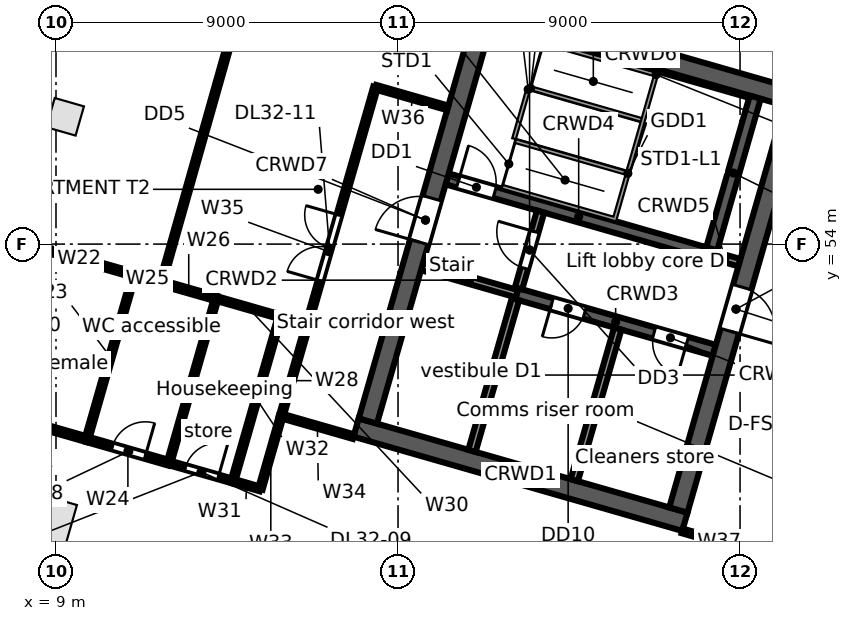
"""IFC4 building model, lengths in metres.
Left out: names, types, materials, properties, quantities, classifications, styles, units other than length and angle.
Written with IfcOpenShell. Run it as: python <this file> out.ifc"""

import sys

from ifc_helpers import new_model, si_unit, direction, frame, frame_2d, origin, origin_2d, place, context, subcontext, project, spatial, rectangle, extrude, element, fill, save


model = new_model("IFC4")
c1 = context("Model", 3, precision=1e-05, world=origin(), true_north=direction((0.0, 1.0)))
c2 = subcontext(c1, "Body", "Model", "MODEL_VIEW")
j1 = project(units=[si_unit("LENGTHUNIT", "METRE"), si_unit("PLANEANGLEUNIT", "RADIAN")], contexts=[c1])
p1 = place(None, origin())
s1 = spatial("IfcSite", under=j1, at=p1, CompositionType="ELEMENT")
p2 = place(p1, origin())
s2 = spatial("IfcBuilding", under=s1, at=p2, CompositionType="ELEMENT")
p3 = place(p2, frame((0.0, 0.0, 154.9)))
s3 = spatial("IfcBuildingStorey", under=s2, at=p3, CompositionType="ELEMENT", Elevation=154.9)
p4 = place(p3, frame((8.81, 46.722, 0.0), z_axis=(0.0, 0.0, 1.0), x_axis=(0.961261695938, -0.275637355817, 0.0)))
e1 = element("IfcColumn", 1, at=p4, inside=s3, PredefinedType="COLUMN", context=c2, shape_type="SweptSolid", body=[
    extrude(rectangle(XDim=1.2, YDim=1.2, at=origin_2d()), origin(), (0.0, 0.0, 1.0), 4.0),
])
p5 = place(p3, frame((9.241, 57.35, 0.0), z_axis=(0.0, 0.0, 1.0), x_axis=(0.961261695938, -0.275637355817, 0.0)))
e2 = element("IfcColumn", 2, at=p5, inside=s3, PredefinedType="COLUMN", context=c2, shape_type="SweptSolid", body=[
    extrude(rectangle(XDim=0.8, YDim=0.8, at=origin_2d()), origin(), (0.0, 0.0, 1.0), 4.0),
])
p6 = place(p3, frame((24.042, 41.106, 0.0), z_axis=(0.0, 0.0, 1.0), x_axis=(-0.961261693976, 0.275637362661, 0.0)))
e3 = element("IfcWall", 3, at=p6, inside=s3, PredefinedType="STANDARD", context=c2, shape_type="SweptSolid", body=[
    extrude(rectangle(XDim=24.948, YDim=0.3, at=frame_2d((12.474, 0.0))), origin(), (0.0, 0.0, 1.0), 3.68),
])
p7 = place(p6, frame((21.441, 0.0, 0.6)))
e4 = element("IfcOpeningElement", 4, at=p7, cuts=e3, PredefinedType="OPENING", context=c2, shape_type="SweptSolid", body=[
    extrude(rectangle(XDim=0.9, YDim=2.4, at=frame_2d((0.45, 1.2))), frame((0.0, 0.16, 0.0), z_axis=(0.0, -1.0, 0.0), x_axis=(1.0, 0.0, 0.0)), (0.0, 0.0, 1.0), 0.32),
])
p8 = place(p6, frame((13.121, 0.0, 0.6)))
e5 = element("IfcOpeningElement", 5, at=p8, cuts=e3, PredefinedType="OPENING", context=c2, shape_type="SweptSolid", body=[
    extrude(rectangle(XDim=0.9, YDim=2.4, at=frame_2d((0.45, 1.2))), frame((0.0, 0.16, 0.0), z_axis=(0.0, -1.0, 0.0), x_axis=(1.0, 0.0, 0.0)), (0.0, 0.0, 1.0), 0.32),
])
p9 = place(p6, frame((10.591, 0.0, 0.0)))
e6 = element("IfcOpeningElement", 6, at=p9, cuts=e3, PredefinedType="OPENING", context=c2, shape_type="SweptSolid", body=[
    extrude(rectangle(XDim=1.8, YDim=2.4, at=frame_2d((0.9, 1.2))), frame((0.0, 0.16, 0.0), z_axis=(0.0, -1.0, 0.0), x_axis=(1.0, 0.0, 0.0)), (0.0, 0.0, 1.0), 0.32),
])
p10 = place(p6, frame((4.8, 0.0, 0.6)))
e7 = element("IfcOpeningElement", 7, at=p10, cuts=e3, PredefinedType="OPENING", context=c2, shape_type="SweptSolid", body=[
    extrude(rectangle(XDim=0.9, YDim=2.4, at=frame_2d((0.45, 1.2))), frame((0.0, 0.16, 0.0), z_axis=(0.0, -1.0, 0.0), x_axis=(1.0, 0.0, 0.0)), (0.0, 0.0, 1.0), 0.32),
])
p11 = place(p6, frame((2.27, 0.0, 0.0)))
e8 = element("IfcOpeningElement", 8, at=p11, cuts=e3, PredefinedType="OPENING", context=c2, shape_type="SweptSolid", body=[
    extrude(rectangle(XDim=1.8, YDim=2.4, at=frame_2d((0.9, 1.2))), frame((0.0, 0.16, 0.0), z_axis=(0.0, -1.0, 0.0), x_axis=(1.0, 0.0, 0.0)), (0.0, 0.0, 1.0), 0.32),
])
p12 = place(p3, frame((37.399, 59.851, 0.0), z_axis=(0.0, 0.0, 1.0), x_axis=(-0.529919986982, -0.848047644532, 0.0)))
e9 = element("IfcWall", 9, at=p12, inside=s3, PredefinedType="STANDARD", context=c2, shape_type="SweptSolid", body=[
    extrude(rectangle(XDim=21.125, YDim=0.3, at=frame_2d((10.562, 0.0))), origin(), (0.0, 0.0, 1.0), 3.68),
])
p13 = place(p12, frame((16.687, 0.0, 0.6)))
e10 = element("IfcOpeningElement", 10, at=p13, cuts=e9, PredefinedType="OPENING", context=c2, shape_type="SweptSolid", body=[
    extrude(rectangle(XDim=0.9, YDim=2.4, at=frame_2d((0.45, 1.2))), frame((0.0, 0.16, 0.0), z_axis=(0.0, -1.0, 0.0), x_axis=(1.0, 0.0, 0.0)), (0.0, 0.0, 1.0), 0.32),
])
p14 = place(p12, frame((13.612, 0.0, 0.0)))
e11 = element("IfcOpeningElement", 11, at=p14, cuts=e9, PredefinedType="OPENING", context=c2, shape_type="SweptSolid", body=[
    extrude(rectangle(XDim=1.8, YDim=2.4, at=frame_2d((0.9, 1.2))), frame((0.0, 0.16, 0.0), z_axis=(0.0, -1.0, 0.0), x_axis=(1.0, 0.0, 0.0)), (0.0, 0.0, 1.0), 0.32),
])
p15 = place(p12, frame((6.187, 0.0, 0.6)))
e12 = element("IfcOpeningElement", 12, at=p15, cuts=e9, PredefinedType="OPENING", context=c2, shape_type="SweptSolid", body=[
    extrude(rectangle(XDim=0.9, YDim=2.4, at=frame_2d((0.45, 1.2))), frame((0.0, 0.16, 0.0), z_axis=(0.0, -1.0, 0.0), x_axis=(1.0, 0.0, 0.0)), (0.0, 0.0, 1.0), 0.32),
])
p16 = place(p12, frame((3.112, 0.0, 0.0)))
e13 = element("IfcOpeningElement", 13, at=p16, cuts=e9, PredefinedType="OPENING", context=c2, shape_type="SweptSolid", body=[
    extrude(rectangle(XDim=1.8, YDim=2.4, at=frame_2d((0.9, 1.2))), frame((0.0, 0.16, 0.0), z_axis=(0.0, -1.0, 0.0), x_axis=(1.0, 0.0, 0.0)), (0.0, 0.0, 1.0), 0.32),
])
p17 = place(p3, frame((16.897, 49.173, 0.0), z_axis=(0.0, 0.0, 1.0), x_axis=(0.96126248289, -0.275634611374, 0.0)))
e14 = element("IfcWall", 14, at=p17, inside=s3, PredefinedType="SOLIDWALL", context=c2, shape_type="SweptSolid", body=[
    extrude(rectangle(XDim=9.0, YDim=0.5, at=frame_2d((4.5, 0.0))), origin(), (0.0, 0.0, 1.0), 3.68),
])
p18 = place(p3, frame((18.632, 53.409, 0.0), z_axis=(0.0, 0.0, 1.0), x_axis=(0.961247078216, -0.275688328772, 0.0)))
e15 = element("IfcWall", 15, at=p18, inside=s3, PredefinedType="SOLIDWALL", context=c2, shape_type="SweptSolid", body=[
    extrude(rectangle(XDim=2.6, YDim=0.2, at=frame_2d((1.3, 0.0))), origin(), (0.0, 0.0, 1.0), 3.68),
])
p19 = place(p3, frame((21.131, 52.692, 0.0), z_axis=(0.0, 0.0, 1.0), x_axis=(0.961271043721, -0.27560475414, 0.0)))
e16 = element("IfcWall", 16, at=p19, inside=s3, PredefinedType="SOLIDWALL", context=c2, shape_type="SweptSolid", body=[
    extrude(rectangle(XDim=5.4, YDim=0.3, at=frame_2d((2.7, 0.0))), origin(), (0.0, 0.0, 1.0), 3.68),
])
p20 = place(p19, frame((0.95, 0.0, 0.0)))
e17 = element("IfcOpeningElement", 17, at=p20, cuts=e16, PredefinedType="OPENING", context=c2, shape_type="SweptSolid", body=[
    extrude(rectangle(XDim=0.9, YDim=2.1, at=frame_2d((0.45, 1.05))), frame((0.0, 0.16, 0.0), z_axis=(0.0, -1.0, 0.0), x_axis=(1.0, 0.0, 0.0)), (0.0, 0.0, 1.0), 0.32),
])
p21 = place(p19, frame((3.75, 0.0, 0.0)))
e18 = element("IfcOpeningElement", 18, at=p21, cuts=e16, PredefinedType="OPENING", context=c2, shape_type="SweptSolid", body=[
    extrude(rectangle(XDim=0.9, YDim=2.1, at=frame_2d((0.45, 1.05))), frame((0.0, 0.16, 0.0), z_axis=(0.0, -1.0, 0.0), x_axis=(1.0, 0.0, 0.0)), (0.0, 0.0, 1.0), 0.32),
])
p22 = place(p3, frame((19.293, 55.716, 0.0), z_axis=(0.0, 0.0, 1.0), x_axis=(0.96125862491, -0.275648065539, 0.0)))
e19 = element("IfcWall", 19, at=p22, inside=s3, PredefinedType="SOLIDWALL", context=c2, shape_type="SweptSolid", body=[
    extrude(rectangle(XDim=7.2, YDim=0.3, at=frame_2d((3.6, 0.0))), origin(), (0.0, 0.0, 1.0), 3.68),
])
p23 = place(p22, frame((0.3, 0.0, 0.0)))
e20 = element("IfcOpeningElement", 20, at=p23, cuts=e19, PredefinedType="OPENING", context=c2, shape_type="SweptSolid", body=[
    extrude(rectangle(XDim=1.0, YDim=2.1, at=frame_2d((0.5, 1.05))), frame((0.0, 0.16, 0.0), z_axis=(0.0, -1.0, 0.0), x_axis=(1.0, 0.0, 0.0)), (0.0, 0.0, 1.0), 0.32),
])
p24 = place(p3, frame((26.214, 53.732, 0.0), z_axis=(0.0, 0.0, 1.0), x_axis=(0.961200870072, -0.275849392554, 0.0)))
e21 = element("IfcWall", 21, at=p24, inside=s3, PredefinedType="SOLIDWALL", context=c2, shape_type="SweptSolid", body=[
    extrude(rectangle(XDim=0.8, YDim=0.2, at=frame_2d((0.4, 0.0))), origin(), (0.0, 0.0, 1.0), 3.68),
])
p25 = place(p3, frame((20.067, 60.228, 0.0), z_axis=(0.0, 0.0, 1.0), x_axis=(0.96126248289, -0.275634611374, 0.0)))
e22 = element("IfcWall", 22, at=p25, inside=s3, PredefinedType="SOLIDWALL", context=c2, shape_type="SweptSolid", body=[
    extrude(rectangle(XDim=9.0, YDim=0.5, at=frame_2d((4.5, 0.0))), origin(), (0.0, 0.0, 1.0), 3.68),
])
p26 = place(p3, frame((17.206, 49.344, 0.0), z_axis=(0.0, 0.0, 1.0), x_axis=(0.275632651182, 0.961263044958, 0.0)))
e23 = element("IfcWall", 23, at=p26, inside=s3, PredefinedType="SOLIDWALL", context=c2, shape_type="SweptSolid", body=[
    extrude(rectangle(XDim=11.0, YDim=0.5, at=frame_2d((5.5, 0.0))), origin(), (0.0, 0.0, 1.0), 3.68),
])
p27 = place(p26, frame((4.9, 0.0, 0.0)))
e24 = element("IfcOpeningElement", 24, at=p27, cuts=e23, PredefinedType="OPENING", context=c2, shape_type="SweptSolid", body=[
    extrude(rectangle(XDim=1.2, YDim=2.1, at=frame_2d((0.6, 1.05))), frame((0.0, 0.26, 0.0), z_axis=(0.0, -1.0, 0.0), x_axis=(1.0, 0.0, 0.0)), (0.0, 0.0, 1.0), 0.52),
])
p28 = place(p3, frame((19.946, 48.559, 0.0), z_axis=(0.0, 0.0, 1.0), x_axis=(0.275668905258, 0.961252648721, 0.0)))
e25 = element("IfcWall", 25, at=p28, inside=s3, PredefinedType="SOLIDWALL", context=c2, shape_type="SweptSolid", body=[
    extrude(rectangle(XDim=4.15, YDim=0.2, at=frame_2d((2.075, 0.0))), origin(), (0.0, 0.0, 1.0), 3.68),
])
p29 = place(p3, frame((21.172, 52.837, 0.0), z_axis=(0.0, 0.0, 1.0), x_axis=(0.275657676022, 0.961255868981, 0.0)))
e26 = element("IfcWall", 26, at=p29, inside=s3, PredefinedType="PARTITIONING", context=c2, shape_type="SweptSolid", body=[
    extrude(rectangle(XDim=2.1, YDim=0.2, at=frame_2d((1.05, 0.0))), origin(), (0.0, 0.0, 1.0), 3.68),
])
p30 = place(p29, frame((0.55, 0.0, 0.0)))
e27 = element("IfcOpeningElement", 27, at=p30, cuts=e26, PredefinedType="OPENING", context=c2, shape_type="SweptSolid", body=[
    extrude(rectangle(XDim=1.0, YDim=2.1, at=frame_2d((0.5, 1.05))), frame((0.0, 0.11, 0.0), z_axis=(0.0, -1.0, 0.0), x_axis=(1.0, 0.0, 0.0)), (0.0, 0.0, 1.0), 0.22),
])
p31 = place(p3, frame((22.637, 47.787, 0.0), z_axis=(0.0, 0.0, 1.0), x_axis=(0.275614546295, 0.961268236171, 0.0)))
e28 = element("IfcWall", 28, at=p31, inside=s3, PredefinedType="PARTITIONING", context=c2, shape_type="SweptSolid", body=[
    extrude(rectangle(XDim=4.15, YDim=0.2, at=frame_2d((2.075, 0.0))), origin(), (0.0, 0.0, 1.0), 3.68),
])
p32 = place(p3, frame((26.256, 53.876, 0.0), z_axis=(0.0, 0.0, 1.0), x_axis=(0.275614546295, 0.961268236171, 0.0)))
e29 = element("IfcWall", 29, at=p32, inside=s3, PredefinedType="SOLIDWALL", context=c2, shape_type="SweptSolid", body=[
    extrude(rectangle(XDim=4.15, YDim=0.3, at=frame_2d((2.075, 0.0))), origin(), (0.0, 0.0, 1.0), 3.68),
])
p33 = place(p3, frame((25.377, 47.002, 0.0), z_axis=(0.0, 0.0, 1.0), x_axis=(0.275632651182, 0.961263044958, 0.0)))
e30 = element("IfcWall", 30, at=p33, inside=s3, PredefinedType="SOLIDWALL", context=c2, shape_type="SweptSolid", body=[
    extrude(rectangle(XDim=11.0, YDim=0.5, at=frame_2d((5.5, 0.0))), origin(), (0.0, 0.0, 1.0), 3.68),
])
p34 = place(p33, frame((4.9, 0.0, 0.0)))
e31 = element("IfcOpeningElement", 31, at=p34, cuts=e30, PredefinedType="OPENING", context=c2, shape_type="SweptSolid", body=[
    extrude(rectangle(XDim=1.2, YDim=2.1, at=frame_2d((0.6, 1.05))), frame((0.0, 0.26, 0.0), z_axis=(0.0, -1.0, 0.0), x_axis=(1.0, 0.0, 0.0)), (0.0, 0.0, 1.0), 0.52),
])
p35 = place(p3, frame((6.927, 49.691, 0.0), z_axis=(0.0, 0.0, 1.0), x_axis=(0.961268664977, -0.27561305073, 0.0)))
e32 = element("IfcWall", 32, at=p35, inside=s3, PredefinedType="PARTITIONING", context=c2, shape_type="SweptSolid", body=[
    extrude(rectangle(XDim=3.0, YDim=0.15, at=frame_2d((1.5, 0.0))), origin(), (0.0, 0.0, 1.0), 2.748),
])
p36 = place(p35, frame((0.95, 0.0, 0.0)))
e33 = element("IfcOpeningElement", 33, at=p36, cuts=e32, PredefinedType="OPENING", context=c2, shape_type="SweptSolid", body=[
    extrude(rectangle(XDim=0.9, YDim=2.1, at=frame_2d((0.45, 1.05))), frame((0.0, 0.085, 0.0), z_axis=(0.0, -1.0, 0.0), x_axis=(1.0, 0.0, 0.0)), (0.0, 0.0, 1.0), 0.17),
])
p37 = place(p3, frame((8.167, 54.017, 0.0), z_axis=(0.0, 0.0, 1.0), x_axis=(0.961247103494, -0.275688240636, 0.0)))
e34 = element("IfcWall", 34, at=p37, inside=s3, PredefinedType="PARTITIONING", context=c2, shape_type="SweptSolid", body=[
    extrude(rectangle(XDim=3.0, YDim=0.15, at=frame_2d((1.5, 0.0))), origin(), (0.0, 0.0, 1.0), 2.748),
])
p38 = place(p3, frame((9.811, 48.864, 0.0), z_axis=(0.0, 0.0, 1.0), x_axis=(0.275545040649, 0.96128816209, 0.0)))
e35 = element("IfcWall", 35, at=p38, inside=s3, PredefinedType="PARTITIONING", context=c2, shape_type="SweptSolid", body=[
    extrude(rectangle(XDim=4.5, YDim=0.125, at=frame_2d((2.25, 0.0))), origin(), (0.0, 0.0, 1.0), 3.68),
])
p39 = place(p3, frame((9.811, 48.864, 0.0), z_axis=(0.0, 0.0, 1.0), x_axis=(0.961236680145, -0.275724581318, 0.0)))
e36 = element("IfcWall", 36, at=p39, inside=s3, PredefinedType="PARTITIONING", context=c2, shape_type="SweptSolid", body=[
    extrude(rectangle(XDim=2.249, YDim=0.15, at=frame_2d((1.125, 0.0))), origin(), (0.0, 0.0, 1.0), 3.68),
])
p40 = place(p39, frame((0.7, 0.0, 0.0)))
e37 = element("IfcOpeningElement", 37, at=p40, cuts=e36, PredefinedType="OPENING", context=c2, shape_type="SweptSolid", body=[
    extrude(rectangle(XDim=0.9, YDim=2.1, at=frame_2d((0.45, 1.05))), frame((0.0, 0.085, 0.0), z_axis=(0.0, -1.0, 0.0), x_axis=(1.0, 0.0, 0.0)), (0.0, 0.0, 1.0), 0.17),
])
p41 = place(p3, frame((11.051, 53.19, 0.0), z_axis=(0.0, 0.0, 1.0), x_axis=(0.961154610169, -0.276010534854, 0.0)))
e38 = element("IfcWall", 38, at=p41, inside=s3, PredefinedType="PARTITIONING", context=c2, shape_type="SweptSolid", body=[
    extrude(rectangle(XDim=0.75, YDim=0.15, at=frame_2d((0.375, 0.0))), origin(), (0.0, 0.0, 1.0), 3.68),
])
p42 = place(p3, frame((11.772, 52.983, 0.0), z_axis=(0.0, 0.0, 1.0), x_axis=(0.961382563126, -0.275215492508, 0.0)))
e39 = element("IfcWall", 39, at=p42, inside=s3, PredefinedType="PARTITIONING", context=c2, shape_type="SweptSolid", body=[
    extrude(rectangle(XDim=1.5, YDim=0.15, at=frame_2d((0.75, 0.0))), origin(), (0.0, 0.0, 1.0), 3.68),
])
p43 = place(p3, frame((11.772, 52.983, 0.0), z_axis=(0.0, 0.0, 1.0), x_axis=(0.272554241659, 0.96214041873, 0.0)))
e40 = element("IfcWall", 40, at=p43, inside=s3, PredefinedType="PARTITIONING", context=c2, shape_type="SweptSolid", body=[
    extrude(rectangle(XDim=14.885, YDim=0.125, at=frame_2d((7.443, 0.0))), origin(), (0.0, 0.0, 1.0), 2.748),
])
p44 = place(p3, frame((11.973, 48.244, 0.0), z_axis=(0.0, 0.0, 1.0), x_axis=(0.275781295989, 0.961220410095, 0.0)))
e41 = element("IfcWall", 41, at=p44, inside=s3, PredefinedType="PARTITIONING", context=c2, shape_type="SweptSolid", body=[
    extrude(rectangle(XDim=4.501, YDim=0.125, at=frame_2d((2.25, 0.0))), origin(), (0.0, 0.0, 1.0), 3.68),
])
p45 = place(p3, frame((11.973, 48.244, 0.0), z_axis=(0.0, 0.0, 1.0), x_axis=(0.96136592135, -0.275273618907, 0.0)))
e42 = element("IfcWall", 42, at=p45, inside=s3, PredefinedType="PARTITIONING", context=c2, shape_type="SweptSolid", body=[
    extrude(rectangle(XDim=1.751, YDim=0.125, at=frame_2d((0.875, 0.0))), origin(), (0.0, 0.0, 1.0), 3.68),
])
p46 = place(p45, frame((0.45, 0.0, 0.0)))
e43 = element("IfcOpeningElement", 43, at=p46, cuts=e42, PredefinedType="OPENING", context=c2, shape_type="SweptSolid", body=[
    extrude(rectangle(XDim=0.9, YDim=2.1, at=frame_2d((0.45, 1.05))), frame((0.0, 0.073, 0.0), z_axis=(0.0, -1.0, 0.0), x_axis=(1.0, 0.0, 0.0)), (0.0, 0.0, 1.0), 0.145),
])
p47 = place(p3, frame((13.214, 52.57, 0.0), z_axis=(0.0, 0.0, 1.0), x_axis=(0.961276075309, -0.275587204055, 0.0)))
e44 = element("IfcWall", 44, at=p47, inside=s3, PredefinedType="PARTITIONING", context=c2, shape_type="SweptSolid", body=[
    extrude(rectangle(XDim=1.75, YDim=0.125, at=frame_2d((0.875, 0.0))), origin(), (0.0, 0.0, 1.0), 3.68),
])
p48 = place(p3, frame((13.656, 47.762, 0.0), z_axis=(0.0, 0.0, 1.0), x_axis=(0.961154610169, -0.276010534854, 0.0)))
e45 = element("IfcWall", 45, at=p48, inside=s3, PredefinedType="PARTITIONING", context=c2, shape_type="SweptSolid", body=[
    extrude(rectangle(XDim=0.75, YDim=0.125, at=frame_2d((0.375, 0.0))), origin(), (0.0, 0.0, 1.0), 3.68),
])
p49 = place(p3, frame((13.656, 47.762, 0.0), z_axis=(0.0, 0.0, 1.0), x_axis=(0.275545040649, 0.96128816209, 0.0)))
e46 = element("IfcWall", 46, at=p49, inside=s3, PredefinedType="PARTITIONING", context=c2, shape_type="SweptSolid", body=[
    extrude(rectangle(XDim=4.5, YDim=0.125, at=frame_2d((2.25, 0.0))), origin(), (0.0, 0.0, 1.0), 3.68),
])
p50 = place(p3, frame((14.377, 47.555, 0.0), z_axis=(0.0, 0.0, 1.0), x_axis=(0.275446387355, 0.961316434736, 0.0)))
e47 = element("IfcWall", 47, at=p50, inside=s3, PredefinedType="PARTITIONING", context=c2, shape_type="SweptSolid", body=[
    extrude(rectangle(XDim=2.0, YDim=0.125, at=frame_2d((1.0, 0.0))), origin(), (0.0, 0.0, 1.0), 3.68),
])
p51 = place(p3, frame((14.928, 49.478, 0.0), z_axis=(0.0, 0.0, 1.0), x_axis=(0.961243778232, -0.27569983462, 0.0)))
e48 = element("IfcWall", 48, at=p51, inside=s3, PredefinedType="PARTITIONING", context=c2, shape_type="SweptSolid", body=[
    extrude(rectangle(XDim=1.977, YDim=0.125, at=frame_2d((0.988, 0.0))), origin(), (0.0, 0.0, 1.0), 3.68),
])
p52 = place(p3, frame((14.928, 49.478, 0.0), z_axis=(0.0, 0.0, 1.0), x_axis=(0.275674053528, 0.961251172281, 0.0)))
e49 = element("IfcWall", 49, at=p52, inside=s3, PredefinedType="PARTITIONING", context=c2, shape_type="SweptSolid", body=[
    extrude(rectangle(XDim=9.0, YDim=0.125, at=frame_2d((4.5, 0.0))), origin(), (0.0, 0.0, 1.0), 2.748),
])
p53 = place(p52, frame((3.7, 0.0, 0.0)))
e50 = element("IfcOpeningElement", 50, at=p53, cuts=e49, PredefinedType="OPENING", context=c2, shape_type="SweptSolid", body=[
    extrude(rectangle(XDim=1.8, YDim=2.1, at=frame_2d((0.9, 1.05))), frame((0.0, 0.073, 0.0), z_axis=(0.0, -1.0, 0.0), x_axis=(1.0, 0.0, 0.0)), (0.0, 0.0, 1.0), 0.145),
])
p54 = place(p3, frame((17.409, 58.129, 0.0), z_axis=(0.0, 0.0, 1.0), x_axis=(0.961253165474, -0.275667103345, 0.0)))
e51 = element("IfcWall", 51, at=p54, inside=s3, PredefinedType="PARTITIONING", context=c2, shape_type="SweptSolid", body=[
    extrude(rectangle(XDim=1.977, YDim=0.125, at=frame_2d((0.988, 0.0))), origin(), (0.0, 0.0, 1.0), 3.68),
])
p55 = place(p3, frame((25.479, 46.452, 0.0), z_axis=(0.0, 0.0, 1.0), x_axis=(0.961245725795, -0.275693044238, 0.0)))
e52 = element("IfcWall", 52, at=p55, inside=s3, PredefinedType="PARTITIONING", context=c2, shape_type="SweptSolid", body=[
    extrude(rectangle(XDim=2.023, YDim=0.125, at=frame_2d((1.012, 0.0))), origin(), (0.0, 0.0, 1.0), 2.952),
])
p56 = place(p23, origin())
e53 = element("IfcDoor", 53, at=p56, inside=s3, OperationType="SINGLE_SWING_LEFT", PredefinedType="DOOR", context=c2, shape_type="SweptSolid", body=[
    extrude(rectangle(XDim=1.0, YDim=2.1, at=frame_2d((0.5, 1.05))), frame((0.0, 0.025, 0.0), z_axis=(0.0, -1.0, 0.0), x_axis=(1.0, 0.0, 0.0)), (0.0, 0.0, 1.0), 0.05),
])
fill(e20, e53)
p57 = place(p30, origin())
e54 = element("IfcDoor", 54, at=p57, inside=s3, OperationType="SINGLE_SWING_RIGHT", PredefinedType="DOOR", context=c2, shape_type="SweptSolid", body=[
    extrude(rectangle(XDim=1.0, YDim=2.1, at=frame_2d((0.5, 1.05))), frame((0.0, 0.025, 0.0), z_axis=(0.0, -1.0, 0.0), x_axis=(1.0, 0.0, 0.0)), (0.0, 0.0, 1.0), 0.05),
])
fill(e27, e54)
p58 = place(p27, origin())
e55 = element("IfcDoor", 55, at=p58, inside=s3, OperationType="SINGLE_SWING_LEFT", PredefinedType="DOOR", context=c2, shape_type="SweptSolid", body=[
    extrude(rectangle(XDim=1.2, YDim=2.1, at=frame_2d((0.6, 1.05))), frame((0.0, 0.025, 0.0), z_axis=(0.0, -1.0, 0.0), x_axis=(1.0, 0.0, 0.0)), (0.0, 0.0, 1.0), 0.05),
])
fill(e24, e55)
p59 = place(p34, frame((1.2, 0.0, 0.0), z_axis=(0.0, 0.0, 1.0), x_axis=(-1.0, 0.0, 0.0)))
e56 = element("IfcDoor", 56, at=p59, inside=s3, OperationType="SINGLE_SWING_RIGHT", PredefinedType="DOOR", context=c2, shape_type="SweptSolid", body=[
    extrude(rectangle(XDim=1.2, YDim=2.1, at=frame_2d((0.6, 1.05))), frame((0.0, 0.025, 0.0), z_axis=(0.0, -1.0, 0.0), x_axis=(1.0, 0.0, 0.0)), (0.0, 0.0, 1.0), 0.05),
])
fill(e31, e56)
p60 = place(p20, frame((0.9, 0.0, 0.0), z_axis=(0.0, 0.0, 1.0), x_axis=(-1.0, 0.0, 0.0)))
e57 = element("IfcDoor", 57, at=p60, inside=s3, OperationType="SINGLE_SWING_RIGHT", PredefinedType="DOOR", context=c2, shape_type="SweptSolid", body=[
    extrude(rectangle(XDim=0.9, YDim=2.1, at=frame_2d((0.45, 1.05))), frame((0.0, 0.025, 0.0), z_axis=(0.0, -1.0, 0.0), x_axis=(1.0, 0.0, 0.0)), (0.0, 0.0, 1.0), 0.05),
])
fill(e17, e57)
p61 = place(p21, frame((0.9, 0.0, 0.0), z_axis=(0.0, 0.0, 1.0), x_axis=(-1.0, 0.0, 0.0)))
e58 = element("IfcDoor", 58, at=p61, inside=s3, OperationType="SINGLE_SWING_LEFT", PredefinedType="DOOR", context=c2, shape_type="SweptSolid", body=[
    extrude(rectangle(XDim=0.9, YDim=2.1, at=frame_2d((0.45, 1.05))), frame((0.0, 0.025, 0.0), z_axis=(0.0, -1.0, 0.0), x_axis=(1.0, 0.0, 0.0)), (0.0, 0.0, 1.0), 0.05),
])
fill(e18, e58)
p62 = place(p40, origin())
e59 = element("IfcDoor", 59, at=p62, inside=s3, OperationType="SINGLE_SWING_RIGHT", PredefinedType="DOOR", context=c2, shape_type="SweptSolid", body=[
    extrude(rectangle(XDim=0.9, YDim=2.1, at=frame_2d((0.45, 1.05))), frame((0.0, 0.025, 0.0), z_axis=(0.0, -1.0, 0.0), x_axis=(1.0, 0.0, 0.0)), (0.0, 0.0, 1.0), 0.05),
])
fill(e37, e59)
p63 = place(p46, origin())
e60 = element("IfcDoor", 60, at=p63, inside=s3, OperationType="SINGLE_SWING_RIGHT", PredefinedType="DOOR", context=c2, shape_type="SweptSolid", body=[
    extrude(rectangle(XDim=0.9, YDim=2.1, at=frame_2d((0.45, 1.05))), frame((0.0, 0.025, 0.0), z_axis=(0.0, -1.0, 0.0), x_axis=(1.0, 0.0, 0.0)), (0.0, 0.0, 1.0), 0.05),
])
fill(e43, e60)
p64 = place(p53, origin())
e61 = element("IfcDoor", 61, at=p64, inside=s3, OperationType="DOUBLE_DOOR_SINGLE_SWING", PredefinedType="DOOR", context=c2, shape_type="SweptSolid", body=[
    extrude(rectangle(XDim=1.8, YDim=2.1, at=frame_2d((0.9, 1.05))), frame((0.0, 0.025, 0.0), z_axis=(0.0, -1.0, 0.0), x_axis=(1.0, 0.0, 0.0)), (0.0, 0.0, 1.0), 0.05),
])
fill(e50, e61)
save(model, sys.argv[1])
